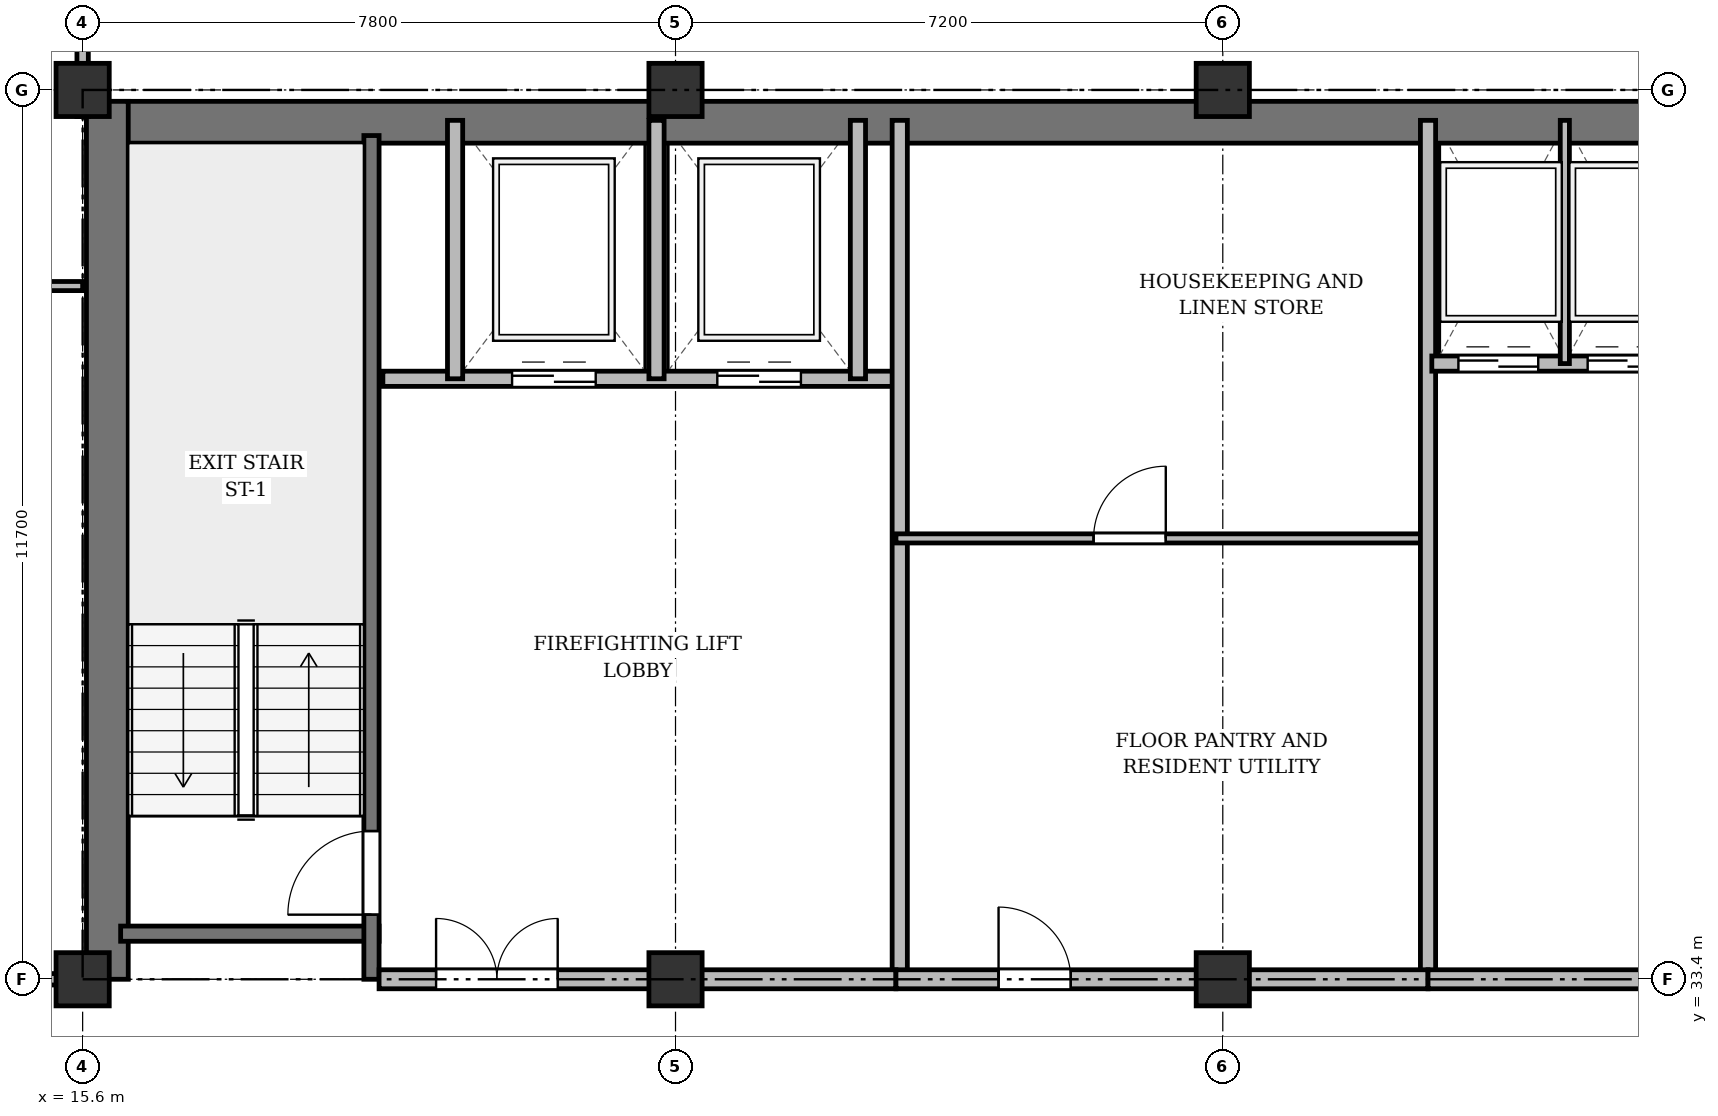
"""IFC4 building model, lengths in metres.
Left out: names, types, materials, properties, quantities, classifications, styles, units other than length and angle.
Written with IfcOpenShell. Run it as: python <this file> out.ifc"""

import sys

from ifc_helpers import new_model, si_unit, direction, frame, frame_2d, origin, origin_2d, place, context, subcontext, project, spatial, rectangle, extrude, source, transform, mapped, element, fill, save


model = new_model("IFC4")
c1 = context("Model", 3, precision=1e-05, world=origin(), true_north=direction((0.0, 1.0)))
c2 = subcontext(c1, "Body", "Model", "MODEL_VIEW")
j1 = project(units=[si_unit("LENGTHUNIT", "METRE"), si_unit("PLANEANGLEUNIT", "RADIAN")], contexts=[c1])
p1 = place(None, origin())
s1 = spatial("IfcSite", under=j1, at=p1, CompositionType="ELEMENT")
p2 = place(p1, origin())
s2 = spatial("IfcBuilding", under=s1, at=p2, CompositionType="ELEMENT")
p3 = place(p2, frame((0.0, 0.0, 171.7)))
s3 = spatial("IfcBuildingStorey", under=s2, at=p3, CompositionType="ELEMENT", Elevation=171.7)
m1 = source(origin(), c2, "Body", "SweptSolid", [
    extrude(rectangle(XDim=0.7, YDim=0.7, at=origin_2d()), origin(), (0.0, 0.0, 1.0), 3.6),
])
for number, where, z_axis, x_axis in (
    (1, (15.6, 33.4, 0.0), (0.0, 0.0, 1.0), (1.0, 0.0, 0.0)),
    (2, (15.6, 45.1, 0.0), (0.0, 0.0, 1.0), (1.0, 0.0, 0.0)),
    (3, (23.4, 33.4, 0.0), (0.0, 0.0, 1.0), (1.0, 0.0, 0.0)),
    (4, (23.4, 45.1, 0.0), (0.0, 0.0, 1.0), (1.0, 0.0, 0.0)),
    (5, (30.6, 33.4, 0.0), (0.0, 0.0, 1.0), (1.0, 0.0, 0.0)),
    (6, (30.6, 45.1, 0.0), (0.0, 0.0, 1.0), (1.0, 0.0, 0.0)),
):
    element("IfcColumn", number, at=place(p3, frame(where, z_axis=z_axis, x_axis=x_axis)), inside=s3, PredefinedType="COLUMN", context=c2, shape_type="MappedRepresentation", body=[
        mapped(m1, transform((0.0, 0.0, 0.0), x_axis=(1.0, 0.0, 0.0), y_axis=(0.0, 1.0, 0.0), z_axis=(0.0, 0.0, 1.0), scale=1.0)),
    ])
p4 = place(p3, frame((15.65, 44.675, 0.0), z_axis=(0.0, 0.0, 1.0), x_axis=(1.0, 0.0, 0.0)))
e7 = element("IfcWall", 7, at=p4, inside=s3, PredefinedType="SHEAR", context=c2, shape_type="SweptSolid", body=[
    extrude(rectangle(XDim=43.1, YDim=0.55, at=frame_2d((21.55, 0.0))), origin(), (0.0, 0.0, 1.0), 3.35),
])
p5 = place(p3, frame((15.925, 33.4, 0.0), z_axis=(0.0, 0.0, 1.0), x_axis=(0.0, 1.0, 0.0)))
e8 = element("IfcWall", 8, at=p5, inside=s3, PredefinedType="SHEAR", context=c2, shape_type="SweptSolid", body=[
    extrude(rectangle(XDim=11.55, YDim=0.55, at=frame_2d((5.775, 0.0))), origin(), (0.0, 0.0, 1.0), 3.35),
])
p6 = place(p3, frame((16.1, 34.0, 0.0), z_axis=(0.0, 0.0, 1.0), x_axis=(1.0, 0.0, 0.0)))
e9 = element("IfcWall", 9, at=p6, inside=s3, PredefinedType="SHEAR", context=c2, shape_type="SweptSolid", body=[
    extrude(rectangle(XDim=3.4, YDim=0.2, at=frame_2d((1.7, 0.0))), origin(), (0.0, 0.0, 1.0), 3.35),
])
p7 = place(p3, frame((19.4, 33.4, 0.0), z_axis=(0.0, 0.0, 1.0), x_axis=(0.0, 1.0, 0.0)))
e10 = element("IfcWall", 10, at=p7, inside=s3, PredefinedType="SHEAR", context=c2, shape_type="SweptSolid", body=[
    extrude(rectangle(XDim=11.1, YDim=0.2, at=frame_2d((5.55, 0.0))), origin(), (0.0, 0.0, 1.0), 3.35),
])
p8 = place(p7, frame((0.85, 0.0, 0.0)))
e11 = element("IfcOpeningElement", 11, at=p8, cuts=e10, PredefinedType="OPENING", context=c2, shape_type="SweptSolid", body=[
    extrude(rectangle(XDim=1.1, YDim=2.15, at=frame_2d((0.55, 1.075))), frame((0.0, 0.11, 0.0), z_axis=(0.0, -1.0, 0.0), x_axis=(1.0, 0.0, 0.0)), (0.0, 0.0, 1.0), 0.22),
])
p9 = place(p3, frame((19.55, 41.3, 0.0), z_axis=(0.0, 0.0, 1.0), x_axis=(1.0, 0.0, 0.0)))
e12 = element("IfcWall", 12, at=p9, inside=s3, PredefinedType="SOLIDWALL", context=c2, shape_type="SweptSolid", body=[
    extrude(rectangle(XDim=6.75, YDim=0.2, at=frame_2d((3.375, 0.0))), origin(), (0.0, 0.0, 1.0), 3.35),
])
p10 = place(p9, frame((1.7, 0.0, 0.0)))
e13 = element("IfcOpeningElement", 13, at=p10, cuts=e12, PredefinedType="OPENING", context=c2, shape_type="SweptSolid", body=[
    extrude(rectangle(XDim=1.1, YDim=2.15, at=frame_2d((0.55, 1.075))), frame((0.0, 0.11, 0.0), z_axis=(0.0, -1.0, 0.0), x_axis=(1.0, 0.0, 0.0)), (0.0, 0.0, 1.0), 0.22),
])
p11 = place(p9, frame((4.4, 0.0, 0.0)))
e14 = element("IfcOpeningElement", 14, at=p11, cuts=e12, PredefinedType="OPENING", context=c2, shape_type="SweptSolid", body=[
    extrude(rectangle(XDim=1.1, YDim=2.15, at=frame_2d((0.55, 1.075))), frame((0.0, 0.11, 0.0), z_axis=(0.0, -1.0, 0.0), x_axis=(1.0, 0.0, 0.0)), (0.0, 0.0, 1.0), 0.22),
])
for number, where, z_axis, x_axis in (
    (15, (20.5, 41.3, 0.0), (0.0, 0.0, 1.0), (0.0, 1.0, 0.0)),
    (16, (23.15, 41.3, 0.0), (0.0, 0.0, 1.0), (0.0, 1.0, 0.0)),
    (17, (25.8, 41.3, 0.0), (0.0, 0.0, 1.0), (0.0, 1.0, 0.0)),
):
    element("IfcWall", number, at=place(p3, frame(where, z_axis=z_axis, x_axis=x_axis)), inside=s3, PredefinedType="SOLIDWALL", context=c2, shape_type="SweptSolid", body=[
        extrude(rectangle(XDim=3.4, YDim=0.2, at=frame_2d((1.7, 0.0))), origin(), (0.0, 0.0, 1.0), 3.35),
    ])
p12 = place(p3, frame((26.35, 33.4, 0.0), z_axis=(0.0, 0.0, 1.0), x_axis=(0.0, 1.0, 0.0)))
e18 = element("IfcWall", 18, at=p12, inside=s3, PredefinedType="SOLIDWALL", context=c2, shape_type="SweptSolid", body=[
    extrude(rectangle(XDim=11.3, YDim=0.2, at=frame_2d((5.65, 0.0))), origin(), (0.0, 0.0, 1.0), 2.75),
])
p13 = place(p3, frame((19.5, 33.4, 0.0), z_axis=(0.0, 0.0, 1.0), x_axis=(1.0, 0.0, 0.0)))
e19 = element("IfcWall", 19, at=p13, inside=s3, PredefinedType="PARTITIONING", context=c2, shape_type="SweptSolid", body=[
    extrude(rectangle(XDim=6.8, YDim=0.25, at=frame_2d((3.4, 0.0))), origin(), (0.0, 0.0, 1.0), 2.75),
])
p14 = place(p13, frame((0.75, 0.0, 0.0)))
e20 = element("IfcOpeningElement", 20, at=p14, cuts=e19, PredefinedType="OPENING", context=c2, shape_type="SweptSolid", body=[
    extrude(rectangle(XDim=1.6, YDim=2.2, at=frame_2d((0.8, 1.1))), frame((0.0, 0.135, 0.0), z_axis=(0.0, -1.0, 0.0), x_axis=(1.0, 0.0, 0.0)), (0.0, 0.0, 1.0), 0.27),
])
p15 = place(p3, frame((26.3, 39.2, 0.0), z_axis=(0.0, 0.0, 1.0), x_axis=(1.0, 0.0, 0.0)))
e21 = element("IfcWall", 21, at=p15, inside=s3, PredefinedType="PARTITIONING", context=c2, shape_type="SweptSolid", body=[
    extrude(rectangle(XDim=7.0, YDim=0.12, at=frame_2d((3.5, 0.0))), origin(), (0.0, 0.0, 1.0), 2.85),
])
p16 = place(p15, frame((2.6, 0.0, 0.0)))
e22 = element("IfcOpeningElement", 22, at=p16, cuts=e21, PredefinedType="OPENING", context=c2, shape_type="SweptSolid", body=[
    extrude(rectangle(XDim=0.95, YDim=2.15, at=frame_2d((0.475, 1.075))), frame((0.0, 0.07, 0.0), z_axis=(0.0, -1.0, 0.0), x_axis=(1.0, 0.0, 0.0)), (0.0, 0.0, 1.0), 0.14),
])
p17 = place(p3, frame((33.3, 33.4, 0.0), z_axis=(0.0, 0.0, 1.0), x_axis=(0.0, 1.0, 0.0)))
e23 = element("IfcWall", 23, at=p17, inside=s3, PredefinedType="SOLIDWALL", context=c2, shape_type="SweptSolid", body=[
    extrude(rectangle(XDim=11.3, YDim=0.2, at=frame_2d((5.65, 0.0))), origin(), (0.0, 0.0, 1.0), 2.75),
])
p18 = place(p3, frame((33.35, 41.5, 0.0), z_axis=(0.0, 0.0, 1.0), x_axis=(1.0, 0.0, 0.0)))
e24 = element("IfcWall", 24, at=p18, inside=s3, PredefinedType="SOLIDWALL", context=c2, shape_type="SweptSolid", body=[
    extrude(rectangle(XDim=6.9, YDim=0.2, at=frame_2d((3.45, 0.0))), origin(), (0.0, 0.0, 1.0), 3.35),
])
p19 = place(p18, frame((0.35, 0.0, 0.0)))
e25 = element("IfcOpeningElement", 25, at=p19, cuts=e24, PredefinedType="OPENING", context=c2, shape_type="SweptSolid", body=[
    extrude(rectangle(XDim=1.05, YDim=2.15, at=frame_2d((0.525, 1.075))), frame((0.0, 0.11, 0.0), z_axis=(0.0, -1.0, 0.0), x_axis=(1.0, 0.0, 0.0)), (0.0, 0.0, 1.0), 0.22),
])
p20 = place(p18, frame((2.05, 0.0, 0.0)))
e26 = element("IfcOpeningElement", 26, at=p20, cuts=e24, PredefinedType="OPENING", context=c2, shape_type="SweptSolid", body=[
    extrude(rectangle(XDim=1.05, YDim=2.15, at=frame_2d((0.525, 1.075))), frame((0.0, 0.11, 0.0), z_axis=(0.0, -1.0, 0.0), x_axis=(1.0, 0.0, 0.0)), (0.0, 0.0, 1.0), 0.22),
])
p21 = place(p18, frame((3.75, 0.0, 0.0)))
e27 = element("IfcOpeningElement", 27, at=p21, cuts=e24, PredefinedType="OPENING", context=c2, shape_type="SweptSolid", body=[
    extrude(rectangle(XDim=1.05, YDim=2.15, at=frame_2d((0.525, 1.075))), frame((0.0, 0.11, 0.0), z_axis=(0.0, -1.0, 0.0), x_axis=(1.0, 0.0, 0.0)), (0.0, 0.0, 1.0), 0.22),
])
p22 = place(p18, frame((5.45, 0.0, 0.0)))
e28 = element("IfcOpeningElement", 28, at=p22, cuts=e24, PredefinedType="OPENING", context=c2, shape_type="SweptSolid", body=[
    extrude(rectangle(XDim=1.05, YDim=2.15, at=frame_2d((0.525, 1.075))), frame((0.0, 0.11, 0.0), z_axis=(0.0, -1.0, 0.0), x_axis=(1.0, 0.0, 0.0)), (0.0, 0.0, 1.0), 0.22),
])
p23 = place(p3, frame((35.1, 41.5, 0.0), z_axis=(0.0, 0.0, 1.0), x_axis=(0.0, 1.0, 0.0)))
e29 = element("IfcWall", 29, at=p23, inside=s3, PredefinedType="PARTITIONING", context=c2, shape_type="SweptSolid", body=[
    extrude(rectangle(XDim=3.2, YDim=0.12, at=frame_2d((1.6, 0.0))), origin(), (0.0, 0.0, 1.0), 3.35),
])
p24 = place(p3, frame((26.3, 33.4, 0.0), z_axis=(0.0, 0.0, 1.0), x_axis=(1.0, 0.0, 0.0)))
e30 = element("IfcWall", 30, at=p24, inside=s3, PredefinedType="PARTITIONING", context=c2, shape_type="SweptSolid", body=[
    extrude(rectangle(XDim=7.0, YDim=0.25, at=frame_2d((3.5, 0.0))), origin(), (0.0, 0.0, 1.0), 2.75),
])
p25 = place(p24, frame((1.35, 0.0, 0.0)))
e31 = element("IfcOpeningElement", 31, at=p25, cuts=e30, PredefinedType="OPENING", context=c2, shape_type="SweptSolid", body=[
    extrude(rectangle(XDim=0.95, YDim=2.15, at=frame_2d((0.475, 1.075))), frame((0.0, 0.135, 0.0), z_axis=(0.0, -1.0, 0.0), x_axis=(1.0, 0.0, 0.0)), (0.0, 0.0, 1.0), 0.27),
])
p26 = place(p3, frame((33.3, 33.4, 0.0), z_axis=(0.0, 0.0, 1.0), x_axis=(1.0, 0.0, 0.0)))
e32 = element("IfcWall", 32, at=p26, inside=s3, PredefinedType="PARTITIONING", context=c2, shape_type="SweptSolid", body=[
    extrude(rectangle(XDim=13.85, YDim=0.25, at=frame_2d((6.925, 0.0))), origin(), (0.0, 0.0, 1.0), 2.75),
])
p27 = place(p26, frame((4.2, 0.0, 0.0)))
e33 = element("IfcOpeningElement", 33, at=p27, cuts=e32, PredefinedType="OPENING", context=c2, shape_type="SweptSolid", body=[
    extrude(rectangle(XDim=1.6, YDim=2.2, at=frame_2d((0.8, 1.1))), frame((0.0, 0.135, 0.0), z_axis=(0.0, -1.0, 0.0), x_axis=(1.0, 0.0, 0.0)), (0.0, 0.0, 1.0), 0.27),
])
p28 = place(p3, frame((11.825, 42.52, 0.0), z_axis=(0.0, 0.0, 1.0), x_axis=(1.0, 0.0, 0.0)))
e34 = element("IfcWall", 34, at=p28, inside=s3, PredefinedType="PARTITIONING", context=c2, shape_type="SweptSolid", body=[
    extrude(rectangle(XDim=3.775, YDim=0.12, at=frame_2d((1.888, 0.0))), origin(), (0.0, 0.0, 1.0), 2.85),
])
p29 = place(p28, frame((1.319, 0.0, 0.0)))
e35 = element("IfcOpeningElement", 35, at=p29, cuts=e34, PredefinedType="OPENING", context=c2, shape_type="SweptSolid", body=[
    extrude(rectangle(XDim=0.95, YDim=2.15, at=frame_2d((0.475, 1.075))), frame((0.0, 0.07, 0.0), z_axis=(0.0, -1.0, 0.0), x_axis=(1.0, 0.0, 0.0)), (0.0, 0.0, 1.0), 0.14),
])
p30 = place(p3, frame((8.05, 33.4, 0.0), z_axis=(0.0, 0.0, 1.0), x_axis=(1.0, 0.0, 0.0)))
e36 = element("IfcWall", 36, at=p30, inside=s3, PredefinedType="PARTITIONING", context=c2, shape_type="SweptSolid", body=[
    extrude(rectangle(XDim=7.55, YDim=0.15, at=frame_2d((3.775, 0.0))), origin(), (0.0, 0.0, 1.0), 2.75),
])
p31 = place(p30, frame((4.375, 0.0, 0.0)))
e37 = element("IfcOpeningElement", 37, at=p31, cuts=e36, PredefinedType="OPENING", context=c2, shape_type="SweptSolid", body=[
    extrude(rectangle(XDim=0.95, YDim=2.15, at=frame_2d((0.475, 1.075))), frame((0.0, 0.085, 0.0), z_axis=(0.0, -1.0, 0.0), x_axis=(1.0, 0.0, 0.0)), (0.0, 0.0, 1.0), 0.17),
])
p32 = place(p3, frame((15.6, 44.75, 0.0), z_axis=(0.0, 0.0, 1.0), x_axis=(0.0, 1.0, 0.0)))
e38 = element("IfcWall", 38, at=p32, inside=s3, PredefinedType="PARTITIONING", context=c2, shape_type="SweptSolid", body=[
    extrude(rectangle(XDim=3.61, YDim=0.15, at=frame_2d((1.805, 0.0))), origin(), (0.0, 0.0, 1.0), 2.85),
])
p33 = place(p32, frame((1.1, 0.0, 0.0)))
e39 = element("IfcOpeningElement", 39, at=p33, cuts=e38, PredefinedType="OPENING", context=c2, shape_type="SweptSolid", body=[
    extrude(rectangle(XDim=0.95, YDim=2.15, at=frame_2d((0.475, 1.075))), frame((0.0, 0.085, 0.0), z_axis=(0.0, -1.0, 0.0), x_axis=(1.0, 0.0, 0.0)), (0.0, 0.0, 1.0), 0.17),
])
m2 = source(origin(), c2, "Body", "SweptSolid", [
    extrude(rectangle(XDim=1.1, YDim=2.15, at=frame_2d((0.55, 1.075))), frame((0.0, 0.025, 0.0), z_axis=(0.0, -1.0, 0.0), x_axis=(1.0, 0.0, 0.0)), (0.0, 0.0, 1.0), 0.05),
])
p34 = place(p8, origin())
e40 = element("IfcDoor", 40, at=p34, inside=s3, OperationType="SINGLE_SWING_LEFT", PredefinedType="DOOR", context=c2, shape_type="MappedRepresentation", body=[
    mapped(m2, transform((0.0, 0.0, 0.0), x_axis=(1.0, 0.0, 0.0), y_axis=(0.0, 1.0, 0.0), z_axis=(0.0, 0.0, 1.0), scale=1.0)),
])
fill(e11, e40)
p35 = place(p10, origin())
e41 = element("IfcDoor", 41, at=p35, inside=s3, OperationType="DOUBLE_DOOR_SLIDING", PredefinedType="DOOR", context=c2, shape_type="MappedRepresentation", body=[
    mapped(m2, transform((0.0, 0.0, 0.0), x_axis=(1.0, 0.0, 0.0), y_axis=(0.0, 1.0, 0.0), z_axis=(0.0, 0.0, 1.0), scale=1.0)),
])
fill(e13, e41)
p36 = place(p11, origin())
e42 = element("IfcDoor", 42, at=p36, inside=s3, OperationType="DOUBLE_DOOR_SLIDING", PredefinedType="DOOR", context=c2, shape_type="MappedRepresentation", body=[
    mapped(m2, transform((0.0, 0.0, 0.0), x_axis=(1.0, 0.0, 0.0), y_axis=(0.0, 1.0, 0.0), z_axis=(0.0, 0.0, 1.0), scale=1.0)),
])
fill(e14, e42)
m3 = source(origin(), c2, "Body", "SweptSolid", [
    extrude(rectangle(XDim=1.6, YDim=2.2, at=frame_2d((0.8, 1.1))), frame((0.0, 0.025, 0.0), z_axis=(0.0, -1.0, 0.0), x_axis=(1.0, 0.0, 0.0)), (0.0, 0.0, 1.0), 0.05),
])
p37 = place(p14, origin())
e43 = element("IfcDoor", 43, at=p37, inside=s3, OperationType="DOUBLE_DOOR_SINGLE_SWING", PredefinedType="DOOR", context=c2, shape_type="MappedRepresentation", body=[
    mapped(m3, transform((0.0, 0.0, 0.0), x_axis=(1.0, 0.0, 0.0), y_axis=(0.0, 1.0, 0.0), z_axis=(0.0, 0.0, 1.0), scale=1.0)),
])
fill(e20, e43)
m4 = source(origin(), c2, "Body", "SweptSolid", [
    extrude(rectangle(XDim=0.95, YDim=2.15, at=frame_2d((0.475, 1.075))), frame((0.0, 0.025, 0.0), z_axis=(0.0, -1.0, 0.0), x_axis=(1.0, 0.0, 0.0)), (0.0, 0.0, 1.0), 0.05),
])
p38 = place(p16, origin())
e44 = element("IfcDoor", 44, at=p38, inside=s3, OperationType="SINGLE_SWING_RIGHT", PredefinedType="DOOR", context=c2, shape_type="MappedRepresentation", body=[
    mapped(m4, transform((0.0, 0.0, 0.0), x_axis=(1.0, 0.0, 0.0), y_axis=(0.0, 1.0, 0.0), z_axis=(0.0, 0.0, 1.0), scale=1.0)),
])
fill(e22, e44)
m5 = source(origin(), c2, "Body", "SweptSolid", [
    extrude(rectangle(XDim=1.05, YDim=2.15, at=frame_2d((0.525, 1.075))), frame((0.0, 0.025, 0.0), z_axis=(0.0, -1.0, 0.0), x_axis=(1.0, 0.0, 0.0)), (0.0, 0.0, 1.0), 0.05),
])
p39 = place(p19, origin())
e45 = element("IfcDoor", 45, at=p39, inside=s3, OperationType="DOUBLE_DOOR_SLIDING", PredefinedType="DOOR", context=c2, shape_type="MappedRepresentation", body=[
    mapped(m5, transform((0.0, 0.0, 0.0), x_axis=(1.0, 0.0, 0.0), y_axis=(0.0, 1.0, 0.0), z_axis=(0.0, 0.0, 1.0), scale=1.0)),
])
fill(e25, e45)
p40 = place(p20, origin())
e46 = element("IfcDoor", 46, at=p40, inside=s3, OperationType="DOUBLE_DOOR_SLIDING", PredefinedType="DOOR", context=c2, shape_type="MappedRepresentation", body=[
    mapped(m5, transform((0.0, 0.0, 0.0), x_axis=(1.0, 0.0, 0.0), y_axis=(0.0, 1.0, 0.0), z_axis=(0.0, 0.0, 1.0), scale=1.0)),
])
fill(e26, e46)
p41 = place(p25, origin())
e47 = element("IfcDoor", 47, at=p41, inside=s3, OperationType="SINGLE_SWING_LEFT", PredefinedType="DOOR", context=c2, shape_type="MappedRepresentation", body=[
    mapped(m4, transform((0.0, 0.0, 0.0), x_axis=(1.0, 0.0, 0.0), y_axis=(0.0, 1.0, 0.0), z_axis=(0.0, 0.0, 1.0), scale=1.0)),
])
fill(e31, e47)
save(model, sys.argv[1])
